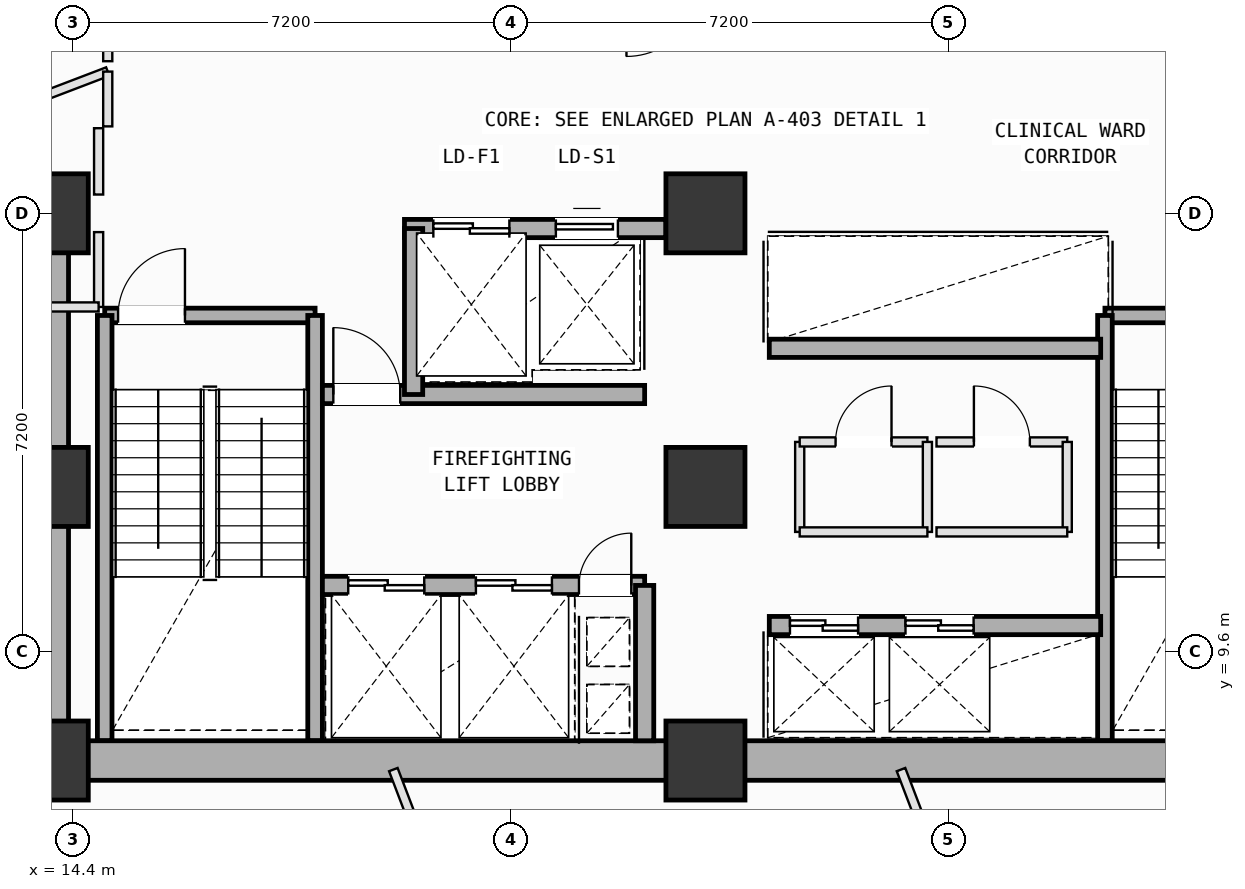
"""IFC4 building model, lengths in metres.
Left out: names, types, materials, properties, quantities, classifications, styles, units other than length and angle.
Written with IfcOpenShell. Run it as: python <this file> out.ifc"""

import sys

from ifc_helpers import new_model, si_unit, direction, frame, frame_2d, origin, origin_2d, place, context, subcontext, project, spatial, rectangle, extrude, element, fill, save


model = new_model("IFC4")
c1 = context("Model", 3, precision=1e-05, world=origin(), true_north=direction((0.0, 1.0)))
c2 = subcontext(c1, "Body", "Model", "MODEL_VIEW")
j1 = project(units=[si_unit("LENGTHUNIT", "METRE"), si_unit("PLANEANGLEUNIT", "RADIAN")], contexts=[c1])
p1 = place(None, origin())
s1 = spatial("IfcSite", under=j1, at=p1, CompositionType="ELEMENT")
p2 = place(p1, origin())
s2 = spatial("IfcBuilding", under=s1, at=p2, CompositionType="ELEMENT")
p3 = place(p2, frame((0.0, 0.0, 112.4)))
s3 = spatial("IfcBuildingStorey", under=s2, at=p3, CompositionType="ELEMENT", Elevation=112.4)
for number, where, z_axis, x_axis in (
    (1, (14.0, 7.8, 0.0), (0.0, 0.0, 1.0), (1.0, 0.0, 0.0)),
    (2, (14.0, 12.3, 0.0), (0.0, 0.0, 1.0), (1.0, 0.0, 0.0)),
    (3, (14.0, 16.8, 0.0), (0.0, 0.0, 1.0), (1.0, 0.0, 0.0)),
    (4, (24.8, 7.8, 0.0), (0.0, 0.0, 1.0), (1.0, 0.0, 0.0)),
    (5, (24.8, 12.3, 0.0), (0.0, 0.0, 1.0), (1.0, 0.0, 0.0)),
    (6, (24.8, 16.8, 0.0), (0.0, 0.0, 1.0), (1.0, 0.0, 0.0)),
):
    element("IfcColumn", number, at=place(p3, frame(where, z_axis=z_axis, x_axis=x_axis)), inside=s3, PredefinedType="COLUMN", context=c2, shape_type="SweptSolid", body=[
        extrude(rectangle(XDim=1.3, YDim=1.3, at=origin_2d()), origin(), (0.0, 0.0, 1.0), 4.0),
    ])
p4 = place(p3, frame((14.92, 15.12, 0.0), z_axis=(0.0, 0.0, 1.0), x_axis=(1.0, 0.0, 0.0)))
e7 = element("IfcWall", 7, at=p4, inside=s3, PredefinedType="SOLIDWALL", context=c2, shape_type="SweptSolid", body=[
    extrude(rectangle(XDim=3.46, YDim=0.24, at=frame_2d((1.73, 0.0))), origin(), (0.0, 0.0, 1.0), 3.78),
])
p5 = place(p4, frame((0.22, 0.0, 0.0)))
e8 = element("IfcOpeningElement", 8, at=p5, cuts=e7, PredefinedType="OPENING", context=c2, shape_type="SweptSolid", body=[
    extrude(rectangle(XDim=1.1, YDim=2.15, at=frame_2d((0.55, 1.075))), frame((0.0, 0.13, 0.0), z_axis=(0.0, -1.0, 0.0), x_axis=(1.0, 0.0, 0.0)), (0.0, 0.0, 1.0), 0.26),
])
for number, where, z_axis, x_axis in (
    (9, (18.38, 15.12, 0.0), (0.0, 0.0, 1.0), (0.0, -1.0, 0.0)),
    (10, (14.92, 8.125, 0.0), (0.0, 0.0, 1.0), (0.0, 1.0, 0.0)),
):
    element("IfcWall", number, at=place(p3, frame(where, z_axis=z_axis, x_axis=x_axis)), inside=s3, PredefinedType="SOLIDWALL", context=c2, shape_type="SweptSolid", body=[
        extrude(rectangle(XDim=6.995, YDim=0.24, at=frame_2d((3.498, 0.0))), origin(), (0.0, 0.0, 1.0), 3.78),
    ])
p6 = place(p3, frame((31.37, 15.12, 0.0), z_axis=(0.0, 0.0, 1.0), x_axis=(1.0, 0.0, 0.0)))
e11 = element("IfcWall", 11, at=p6, inside=s3, PredefinedType="SOLIDWALL", context=c2, shape_type="SweptSolid", body=[
    extrude(rectangle(XDim=3.46, YDim=0.24, at=frame_2d((1.73, 0.0))), origin(), (0.0, 0.0, 1.0), 3.78),
])
p7 = place(p6, frame((2.14, 0.0, 0.0)))
e12 = element("IfcOpeningElement", 12, at=p7, cuts=e11, PredefinedType="OPENING", context=c2, shape_type="SweptSolid", body=[
    extrude(rectangle(XDim=1.1, YDim=2.15, at=frame_2d((0.55, 1.075))), frame((0.0, 0.13, 0.0), z_axis=(0.0, -1.0, 0.0), x_axis=(1.0, 0.0, 0.0)), (0.0, 0.0, 1.0), 0.26),
])
p8 = place(p3, frame((31.37, 8.125, 0.0), z_axis=(0.0, 0.0, 1.0), x_axis=(0.0, 1.0, 0.0)))
e13 = element("IfcWall", 13, at=p8, inside=s3, PredefinedType="SOLIDWALL", context=c2, shape_type="SweptSolid", body=[
    extrude(rectangle(XDim=6.995, YDim=0.24, at=frame_2d((3.498, 0.0))), origin(), (0.0, 0.0, 1.0), 3.78),
])
for number, where, z_axis, x_axis in (
    (14, (14.0, 7.8, 0.0), (0.0, 0.0, 1.0), (1.0, 0.0, 0.0)),
    (15, (24.8, 7.8, 0.0), (0.0, 0.0, 1.0), (1.0, 0.0, 0.0)),
):
    element("IfcWall", number, at=place(p3, frame(where, z_axis=z_axis, x_axis=x_axis)), inside=s3, PredefinedType="SHEAR", context=c2, shape_type="SweptSolid", body=[
        extrude(rectangle(XDim=10.8, YDim=0.65, at=frame_2d((5.4, 0.0))), origin(), (0.0, 0.0, 1.0), 3.78),
    ])
p9 = place(p3, frame((14.0, 16.8, 0.0), z_axis=(0.0, 0.0, 1.0), x_axis=(0.0, -1.0, 0.0)))
e16 = element("IfcWall", 16, at=p9, inside=s3, PredefinedType="SHEAR", context=c2, shape_type="SweptSolid", body=[
    extrude(rectangle(XDim=9.0, YDim=0.65, at=frame_2d((4.5, 0.0))), origin(), (0.0, 0.0, 1.0), 3.78),
])
p10 = place(p3, frame((19.85, 16.55, 0.0), z_axis=(0.0, 0.0, 1.0), x_axis=(1.0, 0.0, 0.0)))
e17 = element("IfcWall", 17, at=p10, inside=s3, PredefinedType="SOLIDWALL", context=c2, shape_type="SweptSolid", body=[
    extrude(rectangle(XDim=4.3, YDim=0.3, at=frame_2d((2.15, 0.0))), origin(), (0.0, 0.0, 1.0), 3.78),
])
p11 = place(p10, frame((0.475, 0.0, 0.0)))
e18 = element("IfcOpeningElement", 18, at=p11, cuts=e17, PredefinedType="OPENING", context=c2, shape_type="SweptSolid", body=[
    extrude(rectangle(XDim=1.25, YDim=2.18, at=frame_2d((0.625, 1.09))), frame((0.0, 0.16, 0.0), z_axis=(0.0, -1.0, 0.0), x_axis=(1.0, 0.0, 0.0)), (0.0, 0.0, 1.0), 0.32),
])
p12 = place(p10, frame((2.49, 0.0, 0.0)))
e19 = element("IfcOpeningElement", 19, at=p12, cuts=e17, PredefinedType="OPENING", context=c2, shape_type="SweptSolid", body=[
    extrude(rectangle(XDim=1.02, YDim=2.12, at=frame_2d((0.51, 1.06))), frame((0.0, 0.16, 0.0), z_axis=(0.0, -1.0, 0.0), x_axis=(1.0, 0.0, 0.0)), (0.0, 0.0, 1.0), 0.32),
])
p13 = place(p3, frame((18.5, 10.68, 0.0), z_axis=(0.0, 0.0, 1.0), x_axis=(1.0, 0.0, 0.0)))
e20 = element("IfcWall", 20, at=p13, inside=s3, PredefinedType="SOLIDWALL", context=c2, shape_type="SweptSolid", body=[
    extrude(rectangle(XDim=5.3, YDim=0.3, at=frame_2d((2.65, 0.0))), origin(), (0.0, 0.0, 1.0), 3.78),
])
p14 = place(p13, frame((4.22, 0.0, 0.0)))
e21 = element("IfcOpeningElement", 21, at=p14, cuts=e20, PredefinedType="OPENING", context=c2, shape_type="SweptSolid", body=[
    extrude(rectangle(XDim=0.86, YDim=2.06, at=frame_2d((0.43, 1.03))), frame((0.0, 0.16, 0.0), z_axis=(0.0, -1.0, 0.0), x_axis=(1.0, 0.0, 0.0)), (0.0, 0.0, 1.0), 0.32),
])
p15 = place(p13, frame((0.425, 0.0, 0.0)))
e22 = element("IfcOpeningElement", 22, at=p15, cuts=e20, PredefinedType="OPENING", context=c2, shape_type="SweptSolid", body=[
    extrude(rectangle(XDim=1.25, YDim=2.18, at=frame_2d((0.625, 1.09))), frame((0.0, 0.16, 0.0), z_axis=(0.0, -1.0, 0.0), x_axis=(1.0, 0.0, 0.0)), (0.0, 0.0, 1.0), 0.32),
])
p16 = place(p13, frame((2.525, 0.0, 0.0)))
e23 = element("IfcOpeningElement", 23, at=p16, cuts=e20, PredefinedType="OPENING", context=c2, shape_type="SweptSolid", body=[
    extrude(rectangle(XDim=1.25, YDim=2.18, at=frame_2d((0.625, 1.09))), frame((0.0, 0.16, 0.0), z_axis=(0.0, -1.0, 0.0), x_axis=(1.0, 0.0, 0.0)), (0.0, 0.0, 1.0), 0.32),
])
p17 = place(p3, frame((18.5, 13.82, 0.0), z_axis=(0.0, 0.0, 1.0), x_axis=(1.0, 0.0, 0.0)))
e24 = element("IfcWall", 24, at=p17, inside=s3, PredefinedType="SOLIDWALL", context=c2, shape_type="SweptSolid", body=[
    extrude(rectangle(XDim=5.3, YDim=0.3, at=frame_2d((2.65, 0.0))), origin(), (0.0, 0.0, 1.0), 3.78),
])
p18 = place(p17, frame((0.18, 0.0, 0.0)))
e25 = element("IfcOpeningElement", 25, at=p18, cuts=e24, PredefinedType="OPENING", context=c2, shape_type="SweptSolid", body=[
    extrude(rectangle(XDim=1.1, YDim=2.15, at=frame_2d((0.55, 1.075))), frame((0.0, 0.16, 0.0), z_axis=(0.0, -1.0, 0.0), x_axis=(1.0, 0.0, 0.0)), (0.0, 0.0, 1.0), 0.32),
])
p19 = place(p3, frame((23.8, 8.125, 0.0), z_axis=(0.0, 0.0, 1.0), x_axis=(0.0, 1.0, 0.0)))
e26 = element("IfcWall", 26, at=p19, inside=s3, PredefinedType="SOLIDWALL", context=c2, shape_type="SweptSolid", body=[
    extrude(rectangle(XDim=2.555, YDim=0.3, at=frame_2d((1.277, 0.0))), origin(), (0.0, 0.0, 1.0), 3.78),
])
p20 = place(p3, frame((20.0, 13.82, 0.0), z_axis=(0.0, 0.0, 1.0), x_axis=(0.0, 1.0, 0.0)))
e27 = element("IfcWall", 27, at=p20, inside=s3, PredefinedType="SOLIDWALL", context=c2, shape_type="SweptSolid", body=[
    extrude(rectangle(XDim=2.73, YDim=0.3, at=frame_2d((1.365, 0.0))), origin(), (0.0, 0.0, 1.0), 3.78),
])
p21 = place(p3, frame((25.85, 10.02, 0.0), z_axis=(0.0, 0.0, 1.0), x_axis=(1.0, 0.0, 0.0)))
e28 = element("IfcWall", 28, at=p21, inside=s3, PredefinedType="SOLIDWALL", context=c2, shape_type="SweptSolid", body=[
    extrude(rectangle(XDim=5.45, YDim=0.3, at=frame_2d((2.725, 0.0))), origin(), (0.0, 0.0, 1.0), 3.78),
])
p22 = place(p21, frame((0.34, 0.0, 0.0)))
e29 = element("IfcOpeningElement", 29, at=p22, cuts=e28, PredefinedType="OPENING", context=c2, shape_type="SweptSolid", body=[
    extrude(rectangle(XDim=1.12, YDim=2.15, at=frame_2d((0.56, 1.075))), frame((0.0, 0.16, 0.0), z_axis=(0.0, -1.0, 0.0), x_axis=(1.0, 0.0, 0.0)), (0.0, 0.0, 1.0), 0.32),
])
p23 = place(p21, frame((2.24, 0.0, 0.0)))
e30 = element("IfcOpeningElement", 30, at=p23, cuts=e28, PredefinedType="OPENING", context=c2, shape_type="SweptSolid", body=[
    extrude(rectangle(XDim=1.12, YDim=2.15, at=frame_2d((0.56, 1.075))), frame((0.0, 0.16, 0.0), z_axis=(0.0, -1.0, 0.0), x_axis=(1.0, 0.0, 0.0)), (0.0, 0.0, 1.0), 0.32),
])
p24 = place(p3, frame((25.85, 14.58, 0.0), z_axis=(0.0, 0.0, 1.0), x_axis=(1.0, 0.0, 0.0)))
e31 = element("IfcWall", 31, at=p24, inside=s3, PredefinedType="SOLIDWALL", context=c2, shape_type="SweptSolid", body=[
    extrude(rectangle(XDim=5.45, YDim=0.3, at=frame_2d((2.725, 0.0))), origin(), (0.0, 0.0, 1.0), 3.78),
])
p25 = place(p3, frame((26.35, 11.56, 0.0), z_axis=(0.0, 0.0, 1.0), x_axis=(0.0, 1.0, 0.0)))
e32 = element("IfcWall", 32, at=p25, inside=s3, PredefinedType="PARTITIONING", context=c2, shape_type="SweptSolid", body=[
    extrude(rectangle(XDim=1.48, YDim=0.15, at=frame_2d((0.74, 0.0))), origin(), (0.0, 0.0, 1.0), 3.78),
])
p26 = place(p3, frame((26.35, 13.04, 0.0), z_axis=(0.0, 0.0, 1.0), x_axis=(1.0, 0.0, 0.0)))
e33 = element("IfcWall", 33, at=p26, inside=s3, PredefinedType="PARTITIONING", context=c2, shape_type="SweptSolid", body=[
    extrude(rectangle(XDim=2.1, YDim=0.15, at=frame_2d((1.05, 0.0))), origin(), (0.0, 0.0, 1.0), 3.78),
])
p27 = place(p26, frame((0.59, 0.0, 0.0)))
e34 = element("IfcOpeningElement", 34, at=p27, cuts=e33, PredefinedType="OPENING", context=c2, shape_type="SweptSolid", body=[
    extrude(rectangle(XDim=0.92, YDim=2.1, at=frame_2d((0.46, 1.05))), frame((0.0, 0.085, 0.0), z_axis=(0.0, -1.0, 0.0), x_axis=(1.0, 0.0, 0.0)), (0.0, 0.0, 1.0), 0.17),
])
p28 = place(p3, frame((28.45, 13.04, 0.0), z_axis=(0.0, 0.0, 1.0), x_axis=(0.0, -1.0, 0.0)))
e35 = element("IfcWall", 35, at=p28, inside=s3, PredefinedType="PARTITIONING", context=c2, shape_type="SweptSolid", body=[
    extrude(rectangle(XDim=1.48, YDim=0.15, at=frame_2d((0.74, 0.0))), origin(), (0.0, 0.0, 1.0), 3.78),
])
p29 = place(p3, frame((28.45, 11.56, 0.0), z_axis=(0.0, 0.0, 1.0), x_axis=(-1.0, 0.0, 0.0)))
e36 = element("IfcWall", 36, at=p29, inside=s3, PredefinedType="PARTITIONING", context=c2, shape_type="SweptSolid", body=[
    extrude(rectangle(XDim=2.1, YDim=0.15, at=frame_2d((1.05, 0.0))), origin(), (0.0, 0.0, 1.0), 3.78),
])
p30 = place(p3, frame((28.6, 13.04, 0.0), z_axis=(0.0, 0.0, 1.0), x_axis=(1.0, 0.0, 0.0)))
e37 = element("IfcWall", 37, at=p30, inside=s3, PredefinedType="PARTITIONING", context=c2, shape_type="SweptSolid", body=[
    extrude(rectangle(XDim=2.15, YDim=0.15, at=frame_2d((1.075, 0.0))), origin(), (0.0, 0.0, 1.0), 3.78),
])
p31 = place(p30, frame((0.615, 0.0, 0.0)))
e38 = element("IfcOpeningElement", 38, at=p31, cuts=e37, PredefinedType="OPENING", context=c2, shape_type="SweptSolid", body=[
    extrude(rectangle(XDim=0.92, YDim=2.1, at=frame_2d((0.46, 1.05))), frame((0.0, 0.085, 0.0), z_axis=(0.0, -1.0, 0.0), x_axis=(1.0, 0.0, 0.0)), (0.0, 0.0, 1.0), 0.17),
])
p32 = place(p3, frame((30.75, 13.04, 0.0), z_axis=(0.0, 0.0, 1.0), x_axis=(0.0, -1.0, 0.0)))
e39 = element("IfcWall", 39, at=p32, inside=s3, PredefinedType="PARTITIONING", context=c2, shape_type="SweptSolid", body=[
    extrude(rectangle(XDim=1.48, YDim=0.15, at=frame_2d((0.74, 0.0))), origin(), (0.0, 0.0, 1.0), 3.78),
])
p33 = place(p3, frame((30.75, 11.56, 0.0), z_axis=(0.0, 0.0, 1.0), x_axis=(-1.0, 0.0, 0.0)))
e40 = element("IfcWall", 40, at=p33, inside=s3, PredefinedType="PARTITIONING", context=c2, shape_type="SweptSolid", body=[
    extrude(rectangle(XDim=2.15, YDim=0.15, at=frame_2d((1.075, 0.0))), origin(), (0.0, 0.0, 1.0), 3.78),
])
p34 = place(p3, frame((15.609, -3.141, 0.0), z_axis=(0.0, 0.0, 1.0), x_axis=(-0.356728640105, 0.934208048204, 0.0)))
e41 = element("IfcWall", 41, at=p34, inside=s3, PredefinedType="PARTITIONING", context=c2, shape_type="SweptSolid", body=[
    extrude(rectangle(XDim=12.735, YDim=0.15, at=frame_2d((6.368, 0.0))), origin(), (0.0, 0.0, 1.0), 2.965),
])
p35 = place(p3, frame((19.667, 7.651, 0.0), z_axis=(0.0, 0.0, 1.0), x_axis=(0.356640290247, -0.934241779933, 0.0)))
e42 = element("IfcWall", 42, at=p35, inside=s3, PredefinedType="PARTITIONING", context=c2, shape_type="SweptSolid", body=[
    extrude(rectangle(XDim=11.064, YDim=0.15, at=frame_2d((5.532, 0.0))), origin(), (0.0, 0.0, 1.0), 3.78),
])
p36 = place(p35, frame((5.263, 0.0, 0.0)))
e43 = element("IfcOpeningElement", 43, at=p36, cuts=e42, PredefinedType="OPENING", context=c2, shape_type="SweptSolid", body=[
    extrude(rectangle(XDim=0.86, YDim=2.06, at=frame_2d((0.43, 1.03))), frame((0.0, 0.085, 0.0), z_axis=(0.0, -1.0, 0.0), x_axis=(1.0, 0.0, 0.0)), (0.0, 0.0, 1.0), 0.17),
])
p37 = place(p3, frame((28.016, 7.651, 0.0), z_axis=(0.0, 0.0, 1.0), x_axis=(0.356612934279, -0.934252222424, 0.0)))
e44 = element("IfcWall", 44, at=p37, inside=s3, PredefinedType="PARTITIONING", context=c2, shape_type="SweptSolid", body=[
    extrude(rectangle(XDim=8.087, YDim=0.15, at=frame_2d((4.043, 0.0))), origin(), (0.0, 0.0, 1.0), 3.78),
])
p38 = place(p37, frame((3.774, 0.0, 0.0)))
e45 = element("IfcOpeningElement", 45, at=p38, cuts=e44, PredefinedType="OPENING", context=c2, shape_type="SweptSolid", body=[
    extrude(rectangle(XDim=0.86, YDim=2.06, at=frame_2d((0.43, 1.03))), frame((0.0, 0.085, 0.0), z_axis=(0.0, -1.0, 0.0), x_axis=(1.0, 0.0, 0.0)), (0.0, 0.0, 1.0), 0.17),
])
p39 = place(p3, frame((14.82, 18.2, 0.0), z_axis=(0.0, 0.0, 1.0), x_axis=(0.0, -1.0, 0.0)))
e46 = element("IfcWall", 46, at=p39, inside=s3, PredefinedType="PARTITIONING", context=c2, shape_type="SweptSolid", body=[
    extrude(rectangle(XDim=1.091, YDim=0.15, at=frame_2d((0.545, 0.0))), origin(), (0.0, 0.0, 1.0), 3.78),
])
p40 = place(p3, frame((14.82, 16.491, 0.0), z_axis=(0.0, 0.0, 1.0), x_axis=(0.0, -1.0, 0.0)))
e47 = element("IfcWall", 47, at=p40, inside=s3, PredefinedType="PARTITIONING", context=c2, shape_type="SweptSolid", body=[
    extrude(rectangle(XDim=1.231, YDim=0.15, at=frame_2d((0.615, 0.0))), origin(), (0.0, 0.0, 1.0), 3.78),
])
p41 = place(p3, frame((14.82, 15.26, 0.0), z_axis=(0.0, 0.0, 1.0), x_axis=(-1.0, 0.0, 0.0)))
e48 = element("IfcWall", 48, at=p41, inside=s3, PredefinedType="PARTITIONING", context=c2, shape_type="SweptSolid", body=[
    extrude(rectangle(XDim=1.12, YDim=0.15, at=frame_2d((0.56, 0.0))), origin(), (0.0, 0.0, 1.0), 3.78),
])
p42 = place(p3, frame((7.524, 16.288, 0.0), z_axis=(0.0, 0.0, 1.0), x_axis=(0.934219128536, 0.356699621358, 0.0)))
e49 = element("IfcWall", 49, at=p42, inside=s3, PredefinedType="PARTITIONING", context=c2, shape_type="SweptSolid", body=[
    extrude(rectangle(XDim=7.97, YDim=0.15, at=frame_2d((3.985, 0.0))), origin(), (0.0, 0.0, 1.0), 3.78),
])
p43 = place(p42, frame((3.555, 0.0, 0.0)))
e50 = element("IfcOpeningElement", 50, at=p43, cuts=e49, PredefinedType="OPENING", context=c2, shape_type="SweptSolid", body=[
    extrude(rectangle(XDim=0.86, YDim=2.06, at=frame_2d((0.43, 1.03))), frame((0.0, 0.085, 0.0), z_axis=(0.0, -1.0, 0.0), x_axis=(1.0, 0.0, 0.0)), (0.0, 0.0, 1.0), 0.17),
])
p44 = place(p3, frame((14.97, 19.131, 0.0), z_axis=(0.0, 0.0, 1.0), x_axis=(0.0, -1.0, 0.0)))
e51 = element("IfcWall", 51, at=p44, inside=s3, PredefinedType="PARTITIONING", context=c2, shape_type="SweptSolid", body=[
    extrude(rectangle(XDim=0.901, YDim=0.15, at=frame_2d((0.451, 0.0))), origin(), (0.0, 0.0, 1.0), 3.78),
])
p45 = place(p3, frame((14.97, 20.55, 0.0), z_axis=(0.0, 0.0, 1.0), x_axis=(0.0, -1.0, 0.0)))
e52 = element("IfcWall", 52, at=p45, inside=s3, PredefinedType="PARTITIONING", context=c2, shape_type="SweptSolid", body=[
    extrude(rectangle(XDim=1.248, YDim=0.15, at=frame_2d((0.624, 0.0))), origin(), (0.0, 0.0, 1.0), 3.78),
])
p46 = place(p5, origin())
e53 = element("IfcDoor", 53, at=p46, inside=s3, OperationType="SINGLE_SWING_RIGHT", PredefinedType="DOOR", context=c2, shape_type="SweptSolid", body=[
    extrude(rectangle(XDim=1.1, YDim=2.15, at=frame_2d((0.55, 1.075))), frame((0.0, 0.025, 0.0), z_axis=(0.0, -1.0, 0.0), x_axis=(1.0, 0.0, 0.0)), (0.0, 0.0, 1.0), 0.05),
])
fill(e8, e53)
p47 = place(p14, origin())
e54 = element("IfcDoor", 54, at=p47, inside=s3, OperationType="SINGLE_SWING_RIGHT", PredefinedType="DOOR", context=c2, shape_type="SweptSolid", body=[
    extrude(rectangle(XDim=0.86, YDim=2.06, at=frame_2d((0.43, 1.03))), frame((0.0, 0.025, 0.0), z_axis=(0.0, -1.0, 0.0), x_axis=(1.0, 0.0, 0.0)), (0.0, 0.0, 1.0), 0.05),
])
fill(e21, e54)
p48 = place(p18, origin())
e55 = element("IfcDoor", 55, at=p48, inside=s3, OperationType="SINGLE_SWING_LEFT", PredefinedType="DOOR", context=c2, shape_type="SweptSolid", body=[
    extrude(rectangle(XDim=1.1, YDim=2.15, at=frame_2d((0.55, 1.075))), frame((0.0, 0.025, 0.0), z_axis=(0.0, -1.0, 0.0), x_axis=(1.0, 0.0, 0.0)), (0.0, 0.0, 1.0), 0.05),
])
fill(e25, e55)
p49 = place(p15, origin())
e56 = element("IfcDoor", 56, at=p49, inside=s3, OperationType="DOUBLE_DOOR_SLIDING", PredefinedType="DOOR", context=c2, shape_type="SweptSolid", body=[
    extrude(rectangle(XDim=1.25, YDim=2.18, at=frame_2d((0.625, 1.09))), frame((0.0, 0.025, 0.0), z_axis=(0.0, -1.0, 0.0), x_axis=(1.0, 0.0, 0.0)), (0.0, 0.0, 1.0), 0.05),
])
fill(e22, e56)
p50 = place(p16, origin())
e57 = element("IfcDoor", 57, at=p50, inside=s3, OperationType="DOUBLE_DOOR_SLIDING", PredefinedType="DOOR", context=c2, shape_type="SweptSolid", body=[
    extrude(rectangle(XDim=1.25, YDim=2.18, at=frame_2d((0.625, 1.09))), frame((0.0, 0.025, 0.0), z_axis=(0.0, -1.0, 0.0), x_axis=(1.0, 0.0, 0.0)), (0.0, 0.0, 1.0), 0.05),
])
fill(e23, e57)
p51 = place(p22, origin())
e58 = element("IfcDoor", 58, at=p51, inside=s3, OperationType="DOUBLE_DOOR_SLIDING", PredefinedType="DOOR", context=c2, shape_type="SweptSolid", body=[
    extrude(rectangle(XDim=1.12, YDim=2.15, at=frame_2d((0.56, 1.075))), frame((0.0, 0.025, 0.0), z_axis=(0.0, -1.0, 0.0), x_axis=(1.0, 0.0, 0.0)), (0.0, 0.0, 1.0), 0.05),
])
fill(e29, e58)
p52 = place(p23, origin())
e59 = element("IfcDoor", 59, at=p52, inside=s3, OperationType="DOUBLE_DOOR_SLIDING", PredefinedType="DOOR", context=c2, shape_type="SweptSolid", body=[
    extrude(rectangle(XDim=1.12, YDim=2.15, at=frame_2d((0.56, 1.075))), frame((0.0, 0.025, 0.0), z_axis=(0.0, -1.0, 0.0), x_axis=(1.0, 0.0, 0.0)), (0.0, 0.0, 1.0), 0.05),
])
fill(e30, e59)
p53 = place(p11, origin())
e60 = element("IfcDoor", 60, at=p53, inside=s3, OperationType="DOUBLE_DOOR_SLIDING", PredefinedType="DOOR", context=c2, shape_type="SweptSolid", body=[
    extrude(rectangle(XDim=1.25, YDim=2.18, at=frame_2d((0.625, 1.09))), frame((0.0, 0.025, 0.0), z_axis=(0.0, -1.0, 0.0), x_axis=(1.0, 0.0, 0.0)), (0.0, 0.0, 1.0), 0.05),
])
fill(e18, e60)
p54 = place(p12, origin())
e61 = element("IfcDoor", 61, at=p54, inside=s3, OperationType="SLIDING_TO_LEFT", PredefinedType="DOOR", context=c2, shape_type="SweptSolid", body=[
    extrude(rectangle(XDim=1.02, YDim=2.12, at=frame_2d((0.51, 1.06))), frame((0.0, 0.025, 0.0), z_axis=(0.0, -1.0, 0.0), x_axis=(1.0, 0.0, 0.0)), (0.0, 0.0, 1.0), 0.05),
])
fill(e19, e61)
p55 = place(p27, origin())
e62 = element("IfcDoor", 62, at=p55, inside=s3, OperationType="SINGLE_SWING_RIGHT", PredefinedType="DOOR", context=c2, shape_type="SweptSolid", body=[
    extrude(rectangle(XDim=0.92, YDim=2.1, at=frame_2d((0.46, 1.05))), frame((0.0, 0.025, 0.0), z_axis=(0.0, -1.0, 0.0), x_axis=(1.0, 0.0, 0.0)), (0.0, 0.0, 1.0), 0.05),
])
fill(e34, e62)
p56 = place(p31, origin())
e63 = element("IfcDoor", 63, at=p56, inside=s3, OperationType="SINGLE_SWING_LEFT", PredefinedType="DOOR", context=c2, shape_type="SweptSolid", body=[
    extrude(rectangle(XDim=0.92, YDim=2.1, at=frame_2d((0.46, 1.05))), frame((0.0, 0.025, 0.0), z_axis=(0.0, -1.0, 0.0), x_axis=(1.0, 0.0, 0.0)), (0.0, 0.0, 1.0), 0.05),
])
fill(e38, e63)
save(model, sys.argv[1])
